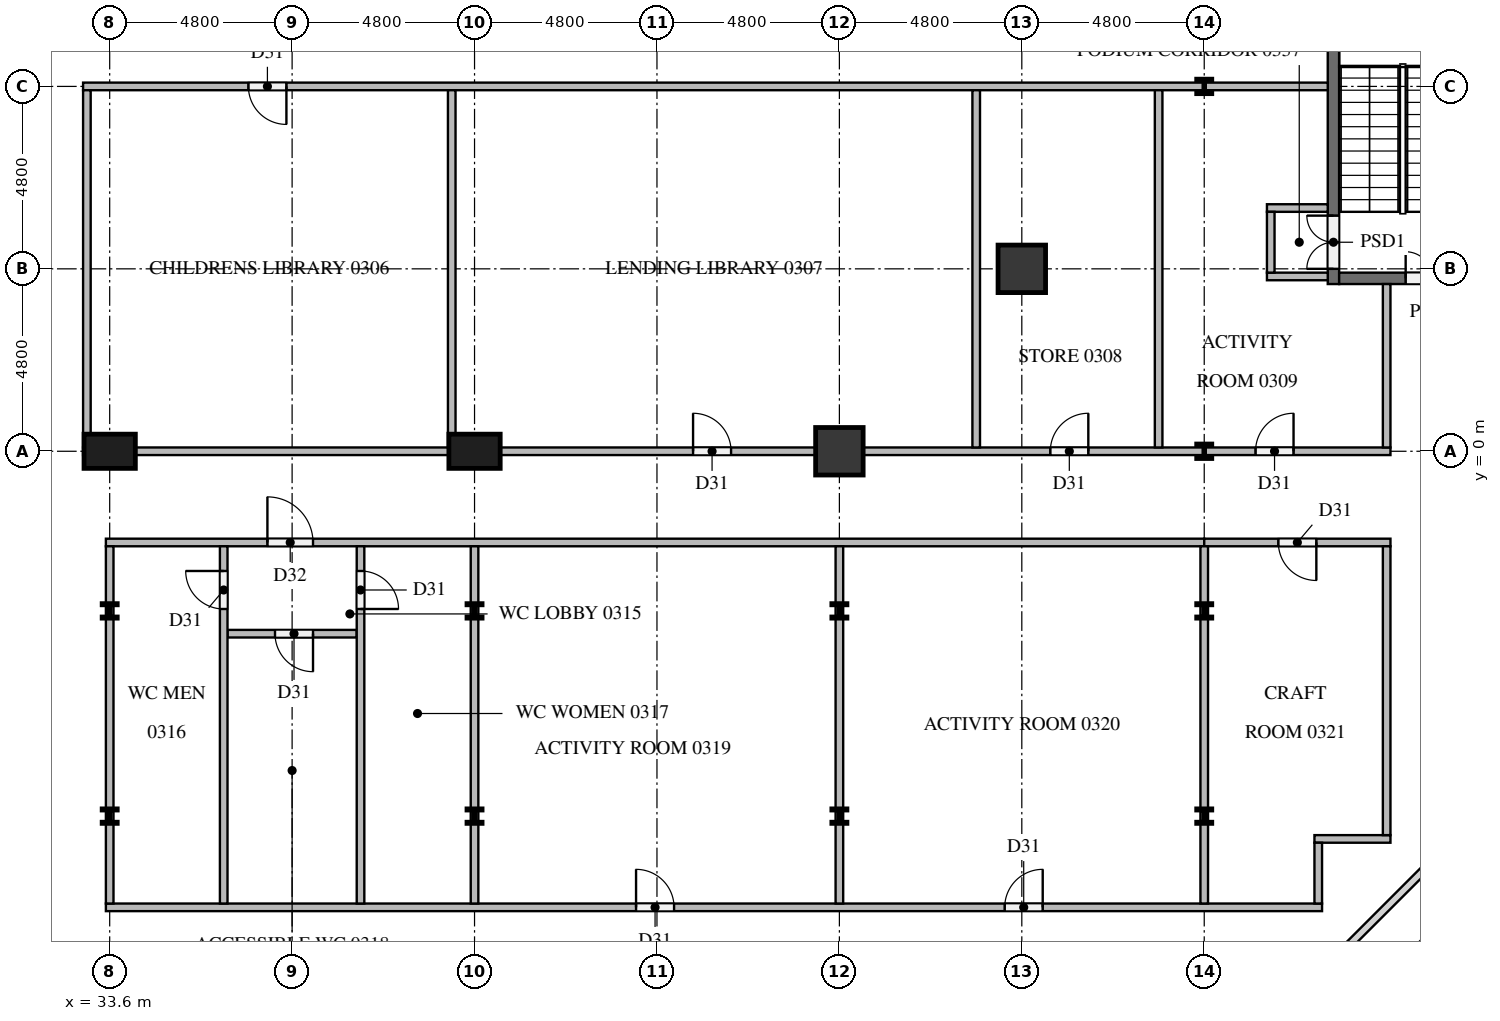
"""IFC4 building model, lengths in metres.
Left out: names, types, materials, properties, quantities, classifications, styles, units other than length and angle.
Written with IfcOpenShell. Run it as: python <this file> out.ifc"""

import sys

from ifc_helpers import new_model, si_unit, direction, frame, frame_2d, origin, origin_2d, place, context, subcontext, project, spatial, rectangle, i_section, extrude, element, fill, save


model = new_model("IFC4")
c1 = context("Model", 3, precision=1e-05, world=origin(), true_north=direction((0.0, 1.0)))
c2 = subcontext(c1, "Body", "Model", "MODEL_VIEW")
j1 = project(units=[si_unit("LENGTHUNIT", "METRE"), si_unit("PLANEANGLEUNIT", "RADIAN")], contexts=[c1])
p1 = place(None, origin())
s1 = spatial("IfcSite", under=j1, at=p1, CompositionType="ELEMENT")
p2 = place(p1, origin())
s2 = spatial("IfcBuilding", under=s1, at=p2, CompositionType="ELEMENT")
p3 = place(p2, frame((0.0, 0.0, 15.0)))
s3 = spatial("IfcBuildingStorey", under=s2, at=p3, CompositionType="ELEMENT", Elevation=15.0)
p4 = place(p3, frame((65.8, 4.4, 0.0), z_axis=(0.0, 0.0, 1.0), x_axis=(0.0, 1.0, 0.0)))
e1 = element("IfcWall", 1, at=p4, inside=s3, PredefinedType="SOLIDWALL", context=c2, shape_type="SweptSolid", body=[
    extrude(rectangle(XDim=8.0, YDim=0.3, at=frame_2d((4.0, 0.0))), origin(), (0.0, 0.0, 1.0), 4.2),
])
p5 = place(p4, frame((0.4, 0.0, 0.0)))
e2 = element("IfcOpeningElement", 2, at=p5, cuts=e1, PredefinedType="OPENING", context=c2, shape_type="SweptSolid", body=[
    extrude(rectangle(XDim=1.4, YDim=2.1, at=frame_2d((0.7, 1.05))), frame((0.0, 0.16, 0.0), z_axis=(0.0, -1.0, 0.0), x_axis=(1.0, 0.0, 0.0)), (0.0, 0.0, 1.0), 0.32),
])
p6 = place(p3, frame((65.95, 4.55, 0.0), z_axis=(0.0, 0.0, 1.0), x_axis=(1.0, 0.0, 0.0)))
e3 = element("IfcWall", 3, at=p6, inside=s3, PredefinedType="SOLIDWALL", context=c2, shape_type="SweptSolid", body=[
    extrude(rectangle(XDim=3.35, YDim=0.3, at=frame_2d((1.675, 0.0))), origin(), (0.0, 0.0, 1.0), 4.2),
])
p7 = place(p6, frame((1.75, 0.0, 0.0)))
e4 = element("IfcOpeningElement", 4, at=p7, cuts=e3, PredefinedType="OPENING", context=c2, shape_type="SweptSolid", body=[
    extrude(rectangle(XDim=1.4, YDim=2.1, at=frame_2d((0.7, 1.05))), frame((0.0, 0.16, 0.0), z_axis=(0.0, -1.0, 0.0), x_axis=(1.0, 0.0, 0.0)), (0.0, 0.0, 1.0), 0.32),
])
for number, where, z_axis, x_axis in (
    (5, (33.6, 0.0, 0.0), (0.0, 0.0, 1.0), (1.0, 0.0, 0.0)),
    (6, (43.2, 0.0, 0.0), (0.0, 0.0, 1.0), (1.0, 0.0, 0.0)),
):
    element("IfcColumn", number, at=place(p3, frame(where, z_axis=z_axis, x_axis=x_axis)), inside=s3, PredefinedType="COLUMN", context=c2, shape_type="SweptSolid", body=[
        extrude(rectangle(XDim=1.35, YDim=0.9, at=origin_2d()), origin(), (0.0, 0.0, 1.0), 4.2),
    ])
for number, where, z_axis, x_axis in (
    (7, (52.8, 0.0, 0.0), (0.0, 0.0, 1.0), (1.0, 0.0, 0.0)),
    (8, (57.6, 4.8, 0.0), (0.0, 0.0, 1.0), (1.0, 0.0, 0.0)),
):
    element("IfcColumn", number, at=place(p3, frame(where, z_axis=z_axis, x_axis=x_axis)), inside=s3, PredefinedType="COLUMN", context=c2, shape_type="SweptSolid", body=[
        extrude(rectangle(XDim=1.25, YDim=1.25, at=origin_2d()), origin(), (0.0, 0.0, 1.0), 4.2),
    ])
for number, where, z_axis, x_axis in (
    (9, (33.6, -9.6, 0.0), (0.0, 0.0, 1.0), (1.0, 0.0, 0.0)),
    (10, (33.6, -4.2, 0.0), (0.0, 0.0, 1.0), (1.0, 0.0, 0.0)),
    (11, (43.2, -9.6, 0.0), (0.0, 0.0, 1.0), (1.0, 0.0, 0.0)),
    (12, (43.2, -4.2, 0.0), (0.0, 0.0, 1.0), (1.0, 0.0, 0.0)),
    (13, (52.8, -9.6, 0.0), (0.0, 0.0, 1.0), (1.0, 0.0, 0.0)),
    (14, (52.8, -4.2, 0.0), (0.0, 0.0, 1.0), (1.0, 0.0, 0.0)),
    (15, (62.4, -9.6, 0.0), (0.0, 0.0, 1.0), (1.0, 0.0, 0.0)),
    (16, (62.4, -4.2, 0.0), (0.0, 0.0, 1.0), (1.0, 0.0, 0.0)),
    (17, (62.4, 0.0, 0.0), (0.0, 0.0, 1.0), (1.0, 0.0, 0.0)),
    (18, (62.4, 9.6, 0.0), (0.0, 0.0, 1.0), (1.0, 0.0, 0.0)),
):
    element("IfcColumn", number, at=place(p3, frame(where, z_axis=z_axis, x_axis=x_axis)), inside=s3, PredefinedType="COLUMN", context=c2, shape_type="SweptSolid", body=[
        extrude(i_section(OverallWidth=0.396, OverallDepth=0.381, WebThickness=0.019, FlangeThickness=0.03, at=origin_2d()), origin(), (0.0, 0.0, 1.0), 4.2),
    ])
p8 = place(p3, frame((33.5, -12.0, 0.0), z_axis=(0.0, 0.0, 1.0), x_axis=(1.0, 0.0, 0.0)))
e19 = element("IfcWall", 19, at=p8, inside=s3, PredefinedType="PARTITIONING", context=c2, shape_type="SweptSolid", body=[
    extrude(rectangle(XDim=32.0, YDim=0.2, at=frame_2d((16.0, 0.0))), origin(), (0.0, 0.0, 1.0), 4.2),
])
p9 = place(p8, frame((13.95, 0.0, 0.0)))
e20 = element("IfcOpeningElement", 20, at=p9, cuts=e19, PredefinedType="OPENING", context=c2, shape_type="SweptSolid", body=[
    extrude(rectangle(XDim=1.0, YDim=2.1, at=frame_2d((0.5, 1.05))), frame((0.0, 0.11, 0.0), z_axis=(0.0, -1.0, 0.0), x_axis=(1.0, 0.0, 0.0)), (0.0, 0.0, 1.0), 0.22),
])
p10 = place(p8, frame((23.65, 0.0, 0.0)))
e21 = element("IfcOpeningElement", 21, at=p10, cuts=e19, PredefinedType="OPENING", context=c2, shape_type="SweptSolid", body=[
    extrude(rectangle(XDim=1.0, YDim=2.1, at=frame_2d((0.5, 1.05))), frame((0.0, 0.11, 0.0), z_axis=(0.0, -1.0, 0.0), x_axis=(1.0, 0.0, 0.0)), (0.0, 0.0, 1.0), 0.22),
])
p11 = place(p3, frame((65.3, -10.2, 0.0), z_axis=(0.0, 0.0, 1.0), x_axis=(1.0, 0.0, 0.0)))
e22 = element("IfcWall", 22, at=p11, inside=s3, PredefinedType="PARTITIONING", context=c2, shape_type="SweptSolid", body=[
    extrude(rectangle(XDim=2.0, YDim=0.2, at=frame_2d((1.0, 0.0))), origin(), (0.0, 0.0, 1.0), 4.2),
])
p12 = place(p3, frame((40.1, -4.8, 0.0), z_axis=(0.0, 0.0, 1.0), x_axis=(-1.0, 0.0, 0.0)))
e23 = element("IfcWall", 23, at=p12, inside=s3, PredefinedType="PARTITIONING", context=c2, shape_type="SweptSolid", body=[
    extrude(rectangle(XDim=3.4, YDim=0.2, at=frame_2d((1.7, 0.0))), origin(), (0.0, 0.0, 1.0), 4.2),
])
p13 = place(p12, frame((1.15, 0.0, 0.0)))
e24 = element("IfcOpeningElement", 24, at=p13, cuts=e23, PredefinedType="OPENING", context=c2, shape_type="SweptSolid", body=[
    extrude(rectangle(XDim=1.0, YDim=2.1, at=frame_2d((0.5, 1.05))), frame((0.0, 0.11, 0.0), z_axis=(0.0, -1.0, 0.0), x_axis=(1.0, 0.0, 0.0)), (0.0, 0.0, 1.0), 0.22),
])
p14 = place(p3, frame((33.5, -2.4, 0.0), z_axis=(0.0, 0.0, 1.0), x_axis=(1.0, 0.0, 0.0)))
e25 = element("IfcWall", 25, at=p14, inside=s3, PredefinedType="PARTITIONING", context=c2, shape_type="SweptSolid", body=[
    extrude(rectangle(XDim=28.9, YDim=0.2, at=frame_2d((14.45, 0.0))), origin(), (0.0, 0.0, 1.0), 4.2),
])
p15 = place(p14, frame((4.25, 0.0, 0.0)))
e26 = element("IfcOpeningElement", 26, at=p15, cuts=e25, PredefinedType="OPENING", context=c2, shape_type="SweptSolid", body=[
    extrude(rectangle(XDim=1.2, YDim=2.1, at=frame_2d((0.6, 1.05))), frame((0.0, 0.11, 0.0), z_axis=(0.0, -1.0, 0.0), x_axis=(1.0, 0.0, 0.0)), (0.0, 0.0, 1.0), 0.22),
])
p16 = place(p3, frame((67.3, -2.4, 0.0), z_axis=(0.0, 0.0, 1.0), x_axis=(-1.0, 0.0, 0.0)))
e27 = element("IfcWall", 27, at=p16, inside=s3, PredefinedType="PARTITIONING", context=c2, shape_type="SweptSolid", body=[
    extrude(rectangle(XDim=4.9, YDim=0.2, at=frame_2d((2.45, 0.0))), origin(), (0.0, 0.0, 1.0), 4.2),
])
p17 = place(p16, frame((1.95, 0.0, 0.0)))
e28 = element("IfcOpeningElement", 28, at=p17, cuts=e27, PredefinedType="OPENING", context=c2, shape_type="SweptSolid", body=[
    extrude(rectangle(XDim=1.0, YDim=2.1, at=frame_2d((0.5, 1.05))), frame((0.0, 0.11, 0.0), z_axis=(0.0, -1.0, 0.0), x_axis=(1.0, 0.0, 0.0)), (0.0, 0.0, 1.0), 0.22),
])
p18 = place(p3, frame((32.9, 0.0, 0.0), z_axis=(0.0, 0.0, 1.0), x_axis=(1.0, 0.0, 0.0)))
e29 = element("IfcWall", 29, at=p18, inside=s3, PredefinedType="PARTITIONING", context=c2, shape_type="SweptSolid", body=[
    extrude(rectangle(XDim=34.4, YDim=0.2, at=frame_2d((17.2, 0.0))), origin(), (0.0, 0.0, 1.0), 4.2),
])
p19 = place(p18, frame((16.05, 0.0, 0.0)))
e30 = element("IfcOpeningElement", 30, at=p19, cuts=e29, PredefinedType="OPENING", context=c2, shape_type="SweptSolid", body=[
    extrude(rectangle(XDim=1.0, YDim=2.1, at=frame_2d((0.5, 1.05))), frame((0.0, 0.11, 0.0), z_axis=(0.0, -1.0, 0.0), x_axis=(1.0, 0.0, 0.0)), (0.0, 0.0, 1.0), 0.22),
])
p20 = place(p18, frame((25.45, 0.0, 0.0)))
e31 = element("IfcOpeningElement", 31, at=p20, cuts=e29, PredefinedType="OPENING", context=c2, shape_type="SweptSolid", body=[
    extrude(rectangle(XDim=1.0, YDim=2.1, at=frame_2d((0.5, 1.05))), frame((0.0, 0.11, 0.0), z_axis=(0.0, -1.0, 0.0), x_axis=(1.0, 0.0, 0.0)), (0.0, 0.0, 1.0), 0.22),
])
p21 = place(p18, frame((30.85, 0.0, 0.0)))
e32 = element("IfcOpeningElement", 32, at=p21, cuts=e29, PredefinedType="OPENING", context=c2, shape_type="SweptSolid", body=[
    extrude(rectangle(XDim=1.0, YDim=2.1, at=frame_2d((0.5, 1.05))), frame((0.0, 0.11, 0.0), z_axis=(0.0, -1.0, 0.0), x_axis=(1.0, 0.0, 0.0)), (0.0, 0.0, 1.0), 0.22),
])
for number, where, z_axis, x_axis in (
    (33, (64.05, 4.6, 0.0), (0.0, 0.0, 1.0), (1.0, 0.0, 0.0)),
    (34, (64.05, 6.4, 0.0), (0.0, 0.0, 1.0), (1.0, 0.0, 0.0)),
):
    element("IfcWall", number, at=place(p3, frame(where, z_axis=z_axis, x_axis=x_axis)), inside=s3, PredefinedType="PARTITIONING", context=c2, shape_type="SweptSolid", body=[
        extrude(rectangle(XDim=1.6, YDim=0.2, at=frame_2d((0.8, 0.0))), origin(), (0.0, 0.0, 1.0), 4.2),
    ])
p22 = place(p3, frame((65.65, 9.6, 0.0), z_axis=(0.0, 0.0, 1.0), x_axis=(-1.0, 0.0, 0.0)))
e35 = element("IfcWall", 35, at=p22, inside=s3, PredefinedType="PARTITIONING", context=c2, shape_type="SweptSolid", body=[
    extrude(rectangle(XDim=32.75, YDim=0.2, at=frame_2d((16.375, 0.0))), origin(), (0.0, 0.0, 1.0), 4.2),
])
p23 = place(p22, frame((27.4, 0.0, 0.0)))
e36 = element("IfcOpeningElement", 36, at=p23, cuts=e35, PredefinedType="OPENING", context=c2, shape_type="SweptSolid", body=[
    extrude(rectangle(XDim=1.0, YDim=2.1, at=frame_2d((0.5, 1.05))), frame((0.0, 0.11, 0.0), z_axis=(0.0, -1.0, 0.0), x_axis=(1.0, 0.0, 0.0)), (0.0, 0.0, 1.0), 0.22),
])
for number, where, z_axis, x_axis in (
    (37, (33.0, 0.1, 0.0), (0.0, 0.0, 1.0), (0.0, 1.0, 0.0)),
    (38, (33.6, -11.9, 0.0), (0.0, 0.0, 1.0), (0.0, 1.0, 0.0)),
):
    element("IfcWall", number, at=place(p3, frame(where, z_axis=z_axis, x_axis=x_axis)), inside=s3, PredefinedType="PARTITIONING", context=c2, shape_type="SweptSolid", body=[
        extrude(rectangle(XDim=9.4, YDim=0.2, at=frame_2d((4.7, 0.0))), origin(), (0.0, 0.0, 1.0), 4.2),
    ])
p24 = place(p3, frame((36.6, -11.9, 0.0), z_axis=(0.0, 0.0, 1.0), x_axis=(0.0, 1.0, 0.0)))
e39 = element("IfcWall", 39, at=p24, inside=s3, PredefinedType="PARTITIONING", context=c2, shape_type="SweptSolid", body=[
    extrude(rectangle(XDim=9.4, YDim=0.2, at=frame_2d((4.7, 0.0))), origin(), (0.0, 0.0, 1.0), 4.2),
])
p25 = place(p24, frame((7.75, 0.0, 0.0)))
e40 = element("IfcOpeningElement", 40, at=p25, cuts=e39, PredefinedType="OPENING", context=c2, shape_type="SweptSolid", body=[
    extrude(rectangle(XDim=1.0, YDim=2.1, at=frame_2d((0.5, 1.05))), frame((0.0, 0.11, 0.0), z_axis=(0.0, -1.0, 0.0), x_axis=(1.0, 0.0, 0.0)), (0.0, 0.0, 1.0), 0.22),
])
p26 = place(p3, frame((40.2, -2.5, 0.0), z_axis=(0.0, 0.0, 1.0), x_axis=(0.0, -1.0, 0.0)))
e41 = element("IfcWall", 41, at=p26, inside=s3, PredefinedType="PARTITIONING", context=c2, shape_type="SweptSolid", body=[
    extrude(rectangle(XDim=9.4, YDim=0.2, at=frame_2d((4.7, 0.0))), origin(), (0.0, 0.0, 1.0), 4.2),
])
p27 = place(p26, frame((0.65, 0.0, 0.0)))
e42 = element("IfcOpeningElement", 42, at=p27, cuts=e41, PredefinedType="OPENING", context=c2, shape_type="SweptSolid", body=[
    extrude(rectangle(XDim=1.0, YDim=2.1, at=frame_2d((0.5, 1.05))), frame((0.0, 0.11, 0.0), z_axis=(0.0, -1.0, 0.0), x_axis=(1.0, 0.0, 0.0)), (0.0, 0.0, 1.0), 0.22),
])
for number, where, z_axis, x_axis in (
    (43, (42.6, 0.1, 0.0), (0.0, 0.0, 1.0), (0.0, 1.0, 0.0)),
    (44, (43.2, -11.9, 0.0), (0.0, 0.0, 1.0), (0.0, 1.0, 0.0)),
    (45, (52.8, -11.9, 0.0), (0.0, 0.0, 1.0), (0.0, 1.0, 0.0)),
    (46, (56.4, 0.1, 0.0), (0.0, 0.0, 1.0), (0.0, 1.0, 0.0)),
    (47, (61.2, 0.1, 0.0), (0.0, 0.0, 1.0), (0.0, 1.0, 0.0)),
    (48, (62.4, -11.9, 0.0), (0.0, 0.0, 1.0), (0.0, 1.0, 0.0)),
):
    element("IfcWall", number, at=place(p3, frame(where, z_axis=z_axis, x_axis=x_axis)), inside=s3, PredefinedType="PARTITIONING", context=c2, shape_type="SweptSolid", body=[
        extrude(rectangle(XDim=9.4, YDim=0.2, at=frame_2d((4.7, 0.0))), origin(), (0.0, 0.0, 1.0), 4.2),
    ])
p28 = place(p3, frame((64.15, 4.7, 0.0), z_axis=(0.0, 0.0, 1.0), x_axis=(0.0, 1.0, 0.0)))
e49 = element("IfcWall", 49, at=p28, inside=s3, PredefinedType="PARTITIONING", context=c2, shape_type="SweptSolid", body=[
    extrude(rectangle(XDim=1.6, YDim=0.2, at=frame_2d((0.8, 0.0))), origin(), (0.0, 0.0, 1.0), 4.2),
])
p29 = place(p3, frame((65.4, -11.9, 0.0), z_axis=(0.0, 0.0, 1.0), x_axis=(0.0, 1.0, 0.0)))
e50 = element("IfcWall", 50, at=p29, inside=s3, PredefinedType="PARTITIONING", context=c2, shape_type="SweptSolid", body=[
    extrude(rectangle(XDim=1.6, YDim=0.2, at=frame_2d((0.8, 0.0))), origin(), (0.0, 0.0, 1.0), 4.2),
])
p30 = place(p3, frame((67.2, -10.1, 0.0), z_axis=(0.0, 0.0, 1.0), x_axis=(0.0, 1.0, 0.0)))
e51 = element("IfcWall", 51, at=p30, inside=s3, PredefinedType="PARTITIONING", context=c2, shape_type="SweptSolid", body=[
    extrude(rectangle(XDim=7.6, YDim=0.2, at=frame_2d((3.8, 0.0))), origin(), (0.0, 0.0, 1.0), 4.2),
])
p31 = place(p3, frame((67.2, 0.1, 0.0), z_axis=(0.0, 0.0, 1.0), x_axis=(0.0, 1.0, 0.0)))
e52 = element("IfcWall", 52, at=p31, inside=s3, PredefinedType="PARTITIONING", context=c2, shape_type="SweptSolid", body=[
    extrude(rectangle(XDim=4.3, YDim=0.2, at=frame_2d((2.15, 0.0))), origin(), (0.0, 0.0, 1.0), 4.2),
])
p32 = place(p5, frame((1.4, 0.0, 0.0), z_axis=(0.0, 0.0, 1.0), x_axis=(-1.0, 0.0, 0.0)))
e53 = element("IfcDoor", 53, at=p32, inside=s3, OperationType="DOUBLE_DOOR_SINGLE_SWING", PredefinedType="DOOR", context=c2, shape_type="SweptSolid", body=[
    extrude(rectangle(XDim=1.4, YDim=2.1, at=frame_2d((0.7, 1.05))), frame((0.0, 0.025, 0.0), z_axis=(0.0, -1.0, 0.0), x_axis=(1.0, 0.0, 0.0)), (0.0, 0.0, 1.0), 0.05),
])
fill(e2, e53)
p33 = place(p7, origin())
e54 = element("IfcDoor", 54, at=p33, inside=s3, OperationType="DOUBLE_DOOR_SINGLE_SWING", PredefinedType="DOOR", context=c2, shape_type="SweptSolid", body=[
    extrude(rectangle(XDim=1.4, YDim=2.1, at=frame_2d((0.7, 1.05))), frame((0.0, 0.025, 0.0), z_axis=(0.0, -1.0, 0.0), x_axis=(1.0, 0.0, 0.0)), (0.0, 0.0, 1.0), 0.05),
])
fill(e4, e54)
p34 = place(p23, origin())
e55 = element("IfcDoor", 55, at=p34, inside=s3, OperationType="SINGLE_SWING_LEFT", PredefinedType="DOOR", context=c2, shape_type="SweptSolid", body=[
    extrude(rectangle(XDim=1.0, YDim=2.1, at=frame_2d((0.5, 1.05))), frame((0.0, 0.025, 0.0), z_axis=(0.0, -1.0, 0.0), x_axis=(1.0, 0.0, 0.0)), (0.0, 0.0, 1.0), 0.05),
])
fill(e36, e55)
p35 = place(p19, origin())
e56 = element("IfcDoor", 56, at=p35, inside=s3, OperationType="SINGLE_SWING_LEFT", PredefinedType="DOOR", context=c2, shape_type="SweptSolid", body=[
    extrude(rectangle(XDim=1.0, YDim=2.1, at=frame_2d((0.5, 1.05))), frame((0.0, 0.025, 0.0), z_axis=(0.0, -1.0, 0.0), x_axis=(1.0, 0.0, 0.0)), (0.0, 0.0, 1.0), 0.05),
])
fill(e30, e56)
p36 = place(p20, origin())
e57 = element("IfcDoor", 57, at=p36, inside=s3, OperationType="SINGLE_SWING_RIGHT", PredefinedType="DOOR", context=c2, shape_type="SweptSolid", body=[
    extrude(rectangle(XDim=1.0, YDim=2.1, at=frame_2d((0.5, 1.05))), frame((0.0, 0.025, 0.0), z_axis=(0.0, -1.0, 0.0), x_axis=(1.0, 0.0, 0.0)), (0.0, 0.0, 1.0), 0.05),
])
fill(e31, e57)
p37 = place(p21, origin())
e58 = element("IfcDoor", 58, at=p37, inside=s3, OperationType="SINGLE_SWING_RIGHT", PredefinedType="DOOR", context=c2, shape_type="SweptSolid", body=[
    extrude(rectangle(XDim=1.0, YDim=2.1, at=frame_2d((0.5, 1.05))), frame((0.0, 0.025, 0.0), z_axis=(0.0, -1.0, 0.0), x_axis=(1.0, 0.0, 0.0)), (0.0, 0.0, 1.0), 0.05),
])
fill(e32, e58)
p38 = place(p15, origin())
e59 = element("IfcDoor", 59, at=p38, inside=s3, OperationType="SINGLE_SWING_LEFT", PredefinedType="DOOR", context=c2, shape_type="SweptSolid", body=[
    extrude(rectangle(XDim=1.2, YDim=2.1, at=frame_2d((0.6, 1.05))), frame((0.0, 0.025, 0.0), z_axis=(0.0, -1.0, 0.0), x_axis=(1.0, 0.0, 0.0)), (0.0, 0.0, 1.0), 0.05),
])
fill(e26, e59)
p39 = place(p25, origin())
e60 = element("IfcDoor", 60, at=p39, inside=s3, OperationType="SINGLE_SWING_RIGHT", PredefinedType="DOOR", context=c2, shape_type="SweptSolid", body=[
    extrude(rectangle(XDim=1.0, YDim=2.1, at=frame_2d((0.5, 1.05))), frame((0.0, 0.025, 0.0), z_axis=(0.0, -1.0, 0.0), x_axis=(1.0, 0.0, 0.0)), (0.0, 0.0, 1.0), 0.05),
])
fill(e40, e60)
p40 = place(p27, origin())
e61 = element("IfcDoor", 61, at=p40, inside=s3, OperationType="SINGLE_SWING_RIGHT", PredefinedType="DOOR", context=c2, shape_type="SweptSolid", body=[
    extrude(rectangle(XDim=1.0, YDim=2.1, at=frame_2d((0.5, 1.05))), frame((0.0, 0.025, 0.0), z_axis=(0.0, -1.0, 0.0), x_axis=(1.0, 0.0, 0.0)), (0.0, 0.0, 1.0), 0.05),
])
fill(e42, e61)
p41 = place(p13, origin())
e62 = element("IfcDoor", 62, at=p41, inside=s3, OperationType="SINGLE_SWING_LEFT", PredefinedType="DOOR", context=c2, shape_type="SweptSolid", body=[
    extrude(rectangle(XDim=1.0, YDim=2.1, at=frame_2d((0.5, 1.05))), frame((0.0, 0.025, 0.0), z_axis=(0.0, -1.0, 0.0), x_axis=(1.0, 0.0, 0.0)), (0.0, 0.0, 1.0), 0.05),
])
fill(e24, e62)
p42 = place(p9, origin())
e63 = element("IfcDoor", 63, at=p42, inside=s3, OperationType="SINGLE_SWING_LEFT", PredefinedType="DOOR", context=c2, shape_type="SweptSolid", body=[
    extrude(rectangle(XDim=1.0, YDim=2.1, at=frame_2d((0.5, 1.05))), frame((0.0, 0.025, 0.0), z_axis=(0.0, -1.0, 0.0), x_axis=(1.0, 0.0, 0.0)), (0.0, 0.0, 1.0), 0.05),
])
fill(e20, e63)
p43 = place(p10, origin())
e64 = element("IfcDoor", 64, at=p43, inside=s3, OperationType="SINGLE_SWING_RIGHT", PredefinedType="DOOR", context=c2, shape_type="SweptSolid", body=[
    extrude(rectangle(XDim=1.0, YDim=2.1, at=frame_2d((0.5, 1.05))), frame((0.0, 0.025, 0.0), z_axis=(0.0, -1.0, 0.0), x_axis=(1.0, 0.0, 0.0)), (0.0, 0.0, 1.0), 0.05),
])
fill(e21, e64)
p44 = place(p17, origin())
e65 = element("IfcDoor", 65, at=p44, inside=s3, OperationType="SINGLE_SWING_LEFT", PredefinedType="DOOR", context=c2, shape_type="SweptSolid", body=[
    extrude(rectangle(XDim=1.0, YDim=2.1, at=frame_2d((0.5, 1.05))), frame((0.0, 0.025, 0.0), z_axis=(0.0, -1.0, 0.0), x_axis=(1.0, 0.0, 0.0)), (0.0, 0.0, 1.0), 0.05),
])
fill(e28, e65)
save(model, sys.argv[1])
